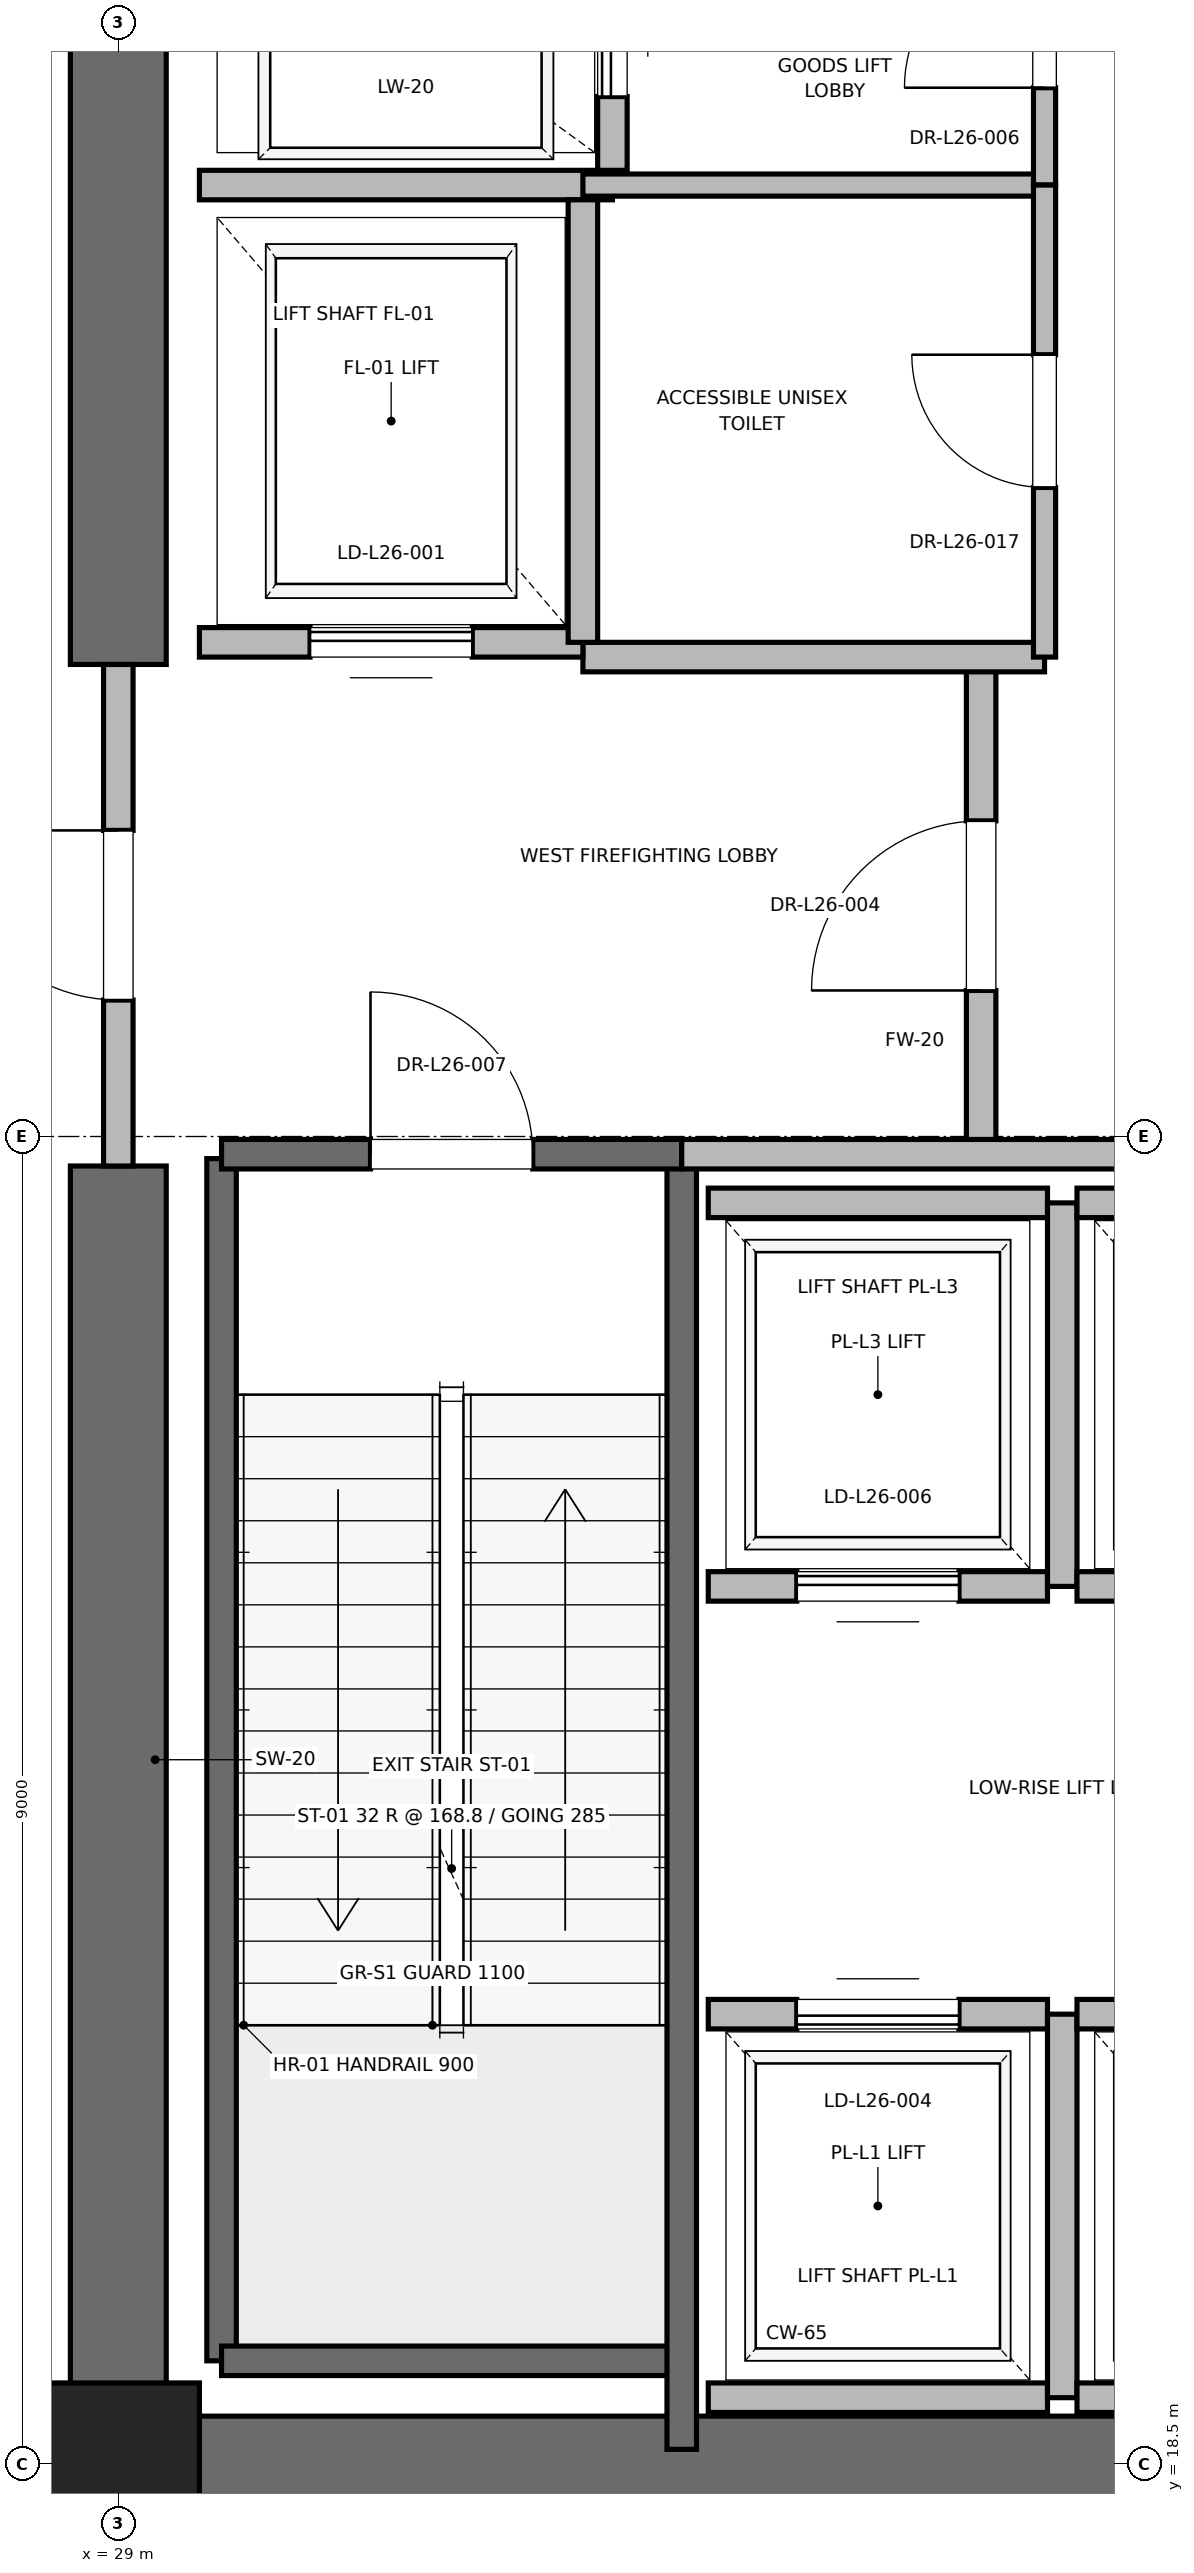
"""IFC4 building model, lengths in metres.
Left out: names, types, materials, properties, quantities, classifications, styles, units other than length and angle.
Written with IfcOpenShell. Run it as: python <this file> out.ifc"""

import sys

from ifc_helpers import new_model, si_unit, direction, frame, frame_2d, origin, origin_2d, place, context, subcontext, project, spatial, rectangle, extrude, element, fill, save


model = new_model("IFC4")
c1 = context("Model", 3, precision=1e-05, world=origin(), true_north=direction((0.0, 1.0)))
c2 = subcontext(c1, "Body", "Model", "MODEL_VIEW")
j1 = project(units=[si_unit("LENGTHUNIT", "METRE"), si_unit("PLANEANGLEUNIT", "RADIAN")], contexts=[c1])
p1 = place(None, origin())
s1 = spatial("IfcSite", under=j1, at=p1, CompositionType="ELEMENT")
p2 = place(p1, origin())
s2 = spatial("IfcBuilding", under=s1, at=p2, CompositionType="ELEMENT")
p3 = place(p2, frame((0.0, 0.0, 113.0)))
s3 = spatial("IfcBuildingStorey", under=s2, at=p3, CompositionType="ELEMENT", Elevation=113.0)
p4 = place(p3, frame((29.0, 18.5, 0.0), z_axis=(0.0, 0.0, 1.0), x_axis=(1.0, 0.0, 0.0)))
e1 = element("IfcColumn", 1, at=p4, inside=s3, PredefinedType="PILASTER", context=c2, shape_type="SweptSolid", body=[
    extrude(rectangle(XDim=1.1, YDim=1.1, at=origin_2d()), origin(), (0.0, 0.0, 1.0), 5.4),
])
p5 = place(p3, frame((29.0, 18.5, 0.0), z_axis=(0.0, 0.0, 1.0), x_axis=(1.0, 0.0, 0.0)))
e2 = element("IfcWall", 2, at=p5, inside=s3, PredefinedType="SHEAR", context=c2, shape_type="SweptSolid", body=[
    extrude(rectangle(XDim=9.2, YDim=0.65, at=frame_2d((4.6, 0.0))), origin(), (0.0, 0.0, 1.0), 5.1),
])
p6 = place(p3, frame((29.0, 18.5, 0.0), z_axis=(0.0, 0.0, 1.0), x_axis=(0.0, 1.0, 0.0)))
e3 = element("IfcWall", 3, at=p6, inside=s3, PredefinedType="SHEAR", context=c2, shape_type="SweptSolid", body=[
    extrude(rectangle(XDim=8.8, YDim=0.65, at=frame_2d((4.4, 0.0))), origin(), (0.0, 0.0, 1.0), 5.1),
])
p7 = place(p3, frame((29.0, 30.7, 0.0), z_axis=(0.0, 0.0, 1.0), x_axis=(0.0, 1.0, 0.0)))
e4 = element("IfcWall", 4, at=p7, inside=s3, PredefinedType="SHEAR", context=c2, shape_type="SweptSolid", body=[
    extrude(rectangle(XDim=5.8, YDim=0.65, at=frame_2d((2.9, 0.0))), origin(), (0.0, 0.0, 1.0), 5.1),
])
p8 = place(p3, frame((29.7, 19.2, 0.0), z_axis=(0.0, 0.0, 1.0), x_axis=(0.0, 1.0, 0.0)))
e5 = element("IfcWall", 5, at=p8, inside=s3, PredefinedType="SOLIDWALL", context=c2, shape_type="SweptSolid", body=[
    extrude(rectangle(XDim=8.15, YDim=0.2, at=frame_2d((4.075, 0.0))), origin(), (0.0, 0.0, 1.0), 5.1),
])
p9 = place(p3, frame((29.7, 19.2, 0.0), z_axis=(0.0, 0.0, 1.0), x_axis=(1.0, 0.0, 0.0)))
e6 = element("IfcWall", 6, at=p9, inside=s3, PredefinedType="SOLIDWALL", context=c2, shape_type="SweptSolid", body=[
    extrude(rectangle(XDim=3.12, YDim=0.2, at=frame_2d((1.56, 0.0))), origin(), (0.0, 0.0, 1.0), 5.1),
])
p10 = place(p3, frame((32.82, 18.6, 0.0), z_axis=(0.0, 0.0, 1.0), x_axis=(0.0, 1.0, 0.0)))
e7 = element("IfcWall", 7, at=p10, inside=s3, PredefinedType="SOLIDWALL", context=c2, shape_type="SweptSolid", body=[
    extrude(rectangle(XDim=8.78, YDim=0.2, at=frame_2d((4.39, 0.0))), origin(), (0.0, 0.0, 1.0), 5.1),
])
p11 = place(p3, frame((29.7, 27.38, 0.0), z_axis=(0.0, 0.0, 1.0), x_axis=(1.0, 0.0, 0.0)))
e8 = element("IfcWall", 8, at=p11, inside=s3, PredefinedType="SOLIDWALL", context=c2, shape_type="SweptSolid", body=[
    extrude(rectangle(XDim=3.12, YDim=0.2, at=frame_2d((1.56, 0.0))), origin(), (0.0, 0.0, 1.0), 5.1),
])
p12 = place(p11, frame((1.01, 0.0, 0.0)))
e9 = element("IfcOpeningElement", 9, at=p12, cuts=e8, PredefinedType="OPENING", context=c2, shape_type="SweptSolid", body=[
    extrude(rectangle(XDim=1.1, YDim=2.15, at=frame_2d((0.55, 1.075))), frame((0.0, 0.1, 0.0), z_axis=(0.0, -1.0, 0.0), x_axis=(1.0, 0.0, 0.0)), (0.0, 0.0, 1.0), 0.2),
])
p13 = place(p3, frame((34.85, 27.38, 0.0), z_axis=(0.0, 0.0, 1.0), x_axis=(0.0, 1.0, 0.0)))
e10 = element("IfcWall", 10, at=p13, inside=s3, PredefinedType="PARTITIONING", context=c2, shape_type="SweptSolid", body=[
    extrude(rectangle(XDim=3.37, YDim=0.2, at=frame_2d((1.685, 0.0))), origin(), (0.0, 0.0, 1.0), 5.1),
])
p14 = place(p13, frame((1.11, 0.0, 0.0)))
e11 = element("IfcOpeningElement", 11, at=p14, cuts=e10, PredefinedType="OPENING", context=c2, shape_type="SweptSolid", body=[
    extrude(rectangle(XDim=1.15, YDim=2.2, at=frame_2d((0.575, 1.1))), frame((0.0, 0.1, 0.0), z_axis=(0.0, -1.0, 0.0), x_axis=(1.0, 0.0, 0.0)), (0.0, 0.0, 1.0), 0.2),
])
p15 = place(p3, frame((29.0, 27.3, 0.0), z_axis=(0.0, 0.0, 1.0), x_axis=(0.0, 1.0, 0.0)))
e12 = element("IfcWall", 12, at=p15, inside=s3, PredefinedType="PARTITIONING", context=c2, shape_type="SweptSolid", body=[
    extrude(rectangle(XDim=3.4, YDim=0.2, at=frame_2d((1.7, 0.0))), origin(), (0.0, 0.0, 1.0), 3.88),
])
p16 = place(p15, frame((1.125, 0.0, 0.0)))
e13 = element("IfcOpeningElement", 13, at=p16, cuts=e12, PredefinedType="OPENING", context=c2, shape_type="SweptSolid", body=[
    extrude(rectangle(XDim=1.15, YDim=2.2, at=frame_2d((0.575, 1.1))), frame((0.0, 0.1, 0.0), z_axis=(0.0, -1.0, 0.0), x_axis=(1.0, 0.0, 0.0)), (0.0, 0.0, 1.0), 0.2),
])
p17 = place(p3, frame((32.82, 27.38, 0.0), z_axis=(0.0, 0.0, 1.0), x_axis=(1.0, 0.0, 0.0)))
e14 = element("IfcWall", 14, at=p17, inside=s3, PredefinedType="PARTITIONING", context=c2, shape_type="SweptSolid", body=[
    extrude(rectangle(XDim=5.62, YDim=0.2, at=frame_2d((2.81, 0.0))), origin(), (0.0, 0.0, 1.0), 5.1),
])
p18 = place(p3, frame((32.15, 30.75, 0.0), z_axis=(0.0, 0.0, 1.0), x_axis=(1.0, 0.0, 0.0)))
e15 = element("IfcWall", 15, at=p18, inside=s3, PredefinedType="PARTITIONING", context=c2, shape_type="SweptSolid", body=[
    extrude(rectangle(XDim=3.13, YDim=0.2, at=frame_2d((1.565, 0.0))), origin(), (0.0, 0.0, 1.0), 5.1),
])
p19 = place(p3, frame((29.55, 30.85, 0.0), z_axis=(0.0, 0.0, 1.0), x_axis=(1.0, 0.0, 0.0)))
e16 = element("IfcWall", 16, at=p19, inside=s3, PredefinedType="SOLIDWALL", context=c2, shape_type="SweptSolid", body=[
    extrude(rectangle(XDim=2.6, YDim=0.2, at=frame_2d((1.3, 0.0))), origin(), (0.0, 0.0, 1.0), 3.88),
])
p20 = place(p19, frame((0.75, 0.0, 0.0)))
e17 = element("IfcOpeningElement", 17, at=p20, cuts=e16, PredefinedType="OPENING", context=c2, shape_type="SweptSolid", body=[
    extrude(rectangle(XDim=1.1, YDim=2.2, at=frame_2d((0.55, 1.1))), frame((0.0, 0.1, 0.0), z_axis=(0.0, -1.0, 0.0), x_axis=(1.0, 0.0, 0.0)), (0.0, 0.0, 1.0), 0.2),
])
p21 = place(p3, frame((29.55, 33.95, 0.0), z_axis=(0.0, 0.0, 1.0), x_axis=(1.0, 0.0, 0.0)))
e18 = element("IfcWall", 18, at=p21, inside=s3, PredefinedType="SOLIDWALL", context=c2, shape_type="SweptSolid", body=[
    extrude(rectangle(XDim=2.8, YDim=0.2, at=frame_2d((1.4, 0.0))), origin(), (0.0, 0.0, 1.0), 5.1),
])
p22 = place(p3, frame((32.15, 30.85, 0.0), z_axis=(0.0, 0.0, 1.0), x_axis=(0.0, 1.0, 0.0)))
e19 = element("IfcWall", 19, at=p22, inside=s3, PredefinedType="SOLIDWALL", context=c2, shape_type="SweptSolid", body=[
    extrude(rectangle(XDim=3.0, YDim=0.2, at=frame_2d((1.5, 0.0))), origin(), (0.0, 0.0, 1.0), 5.1),
])
p23 = place(p3, frame((32.35, 34.05, 0.0), z_axis=(0.0, 0.0, 1.0), x_axis=(0.0, 1.0, 0.0)))
e20 = element("IfcWall", 20, at=p23, inside=s3, PredefinedType="SOLIDWALL", context=c2, shape_type="SweptSolid", body=[
    extrude(rectangle(XDim=2.1, YDim=0.2, at=frame_2d((1.05, 0.0))), origin(), (0.0, 0.0, 1.0), 5.1),
])
p24 = place(p23, frame((0.5, 0.0, 0.0)))
e21 = element("IfcOpeningElement", 21, at=p24, cuts=e20, PredefinedType="OPENING", context=c2, shape_type="SweptSolid", body=[
    extrude(rectangle(XDim=1.1, YDim=2.2, at=frame_2d((0.55, 1.1))), frame((0.0, 0.1, 0.0), z_axis=(0.0, -1.0, 0.0), x_axis=(1.0, 0.0, 0.0)), (0.0, 0.0, 1.0), 0.2),
])
p25 = place(p3, frame((33.0, 18.95, 0.0), z_axis=(0.0, 0.0, 1.0), x_axis=(1.0, 0.0, 0.0)))
e22 = element("IfcWall", 22, at=p25, inside=s3, PredefinedType="SOLIDWALL", context=c2, shape_type="SweptSolid", body=[
    extrude(rectangle(XDim=2.3, YDim=0.2, at=frame_2d((1.15, 0.0))), origin(), (0.0, 0.0, 1.0), 5.1),
])
p26 = place(p3, frame((35.3, 21.55, 0.0), z_axis=(0.0, 0.0, 1.0), x_axis=(-1.0, 0.0, 0.0)))
e23 = element("IfcWall", 23, at=p26, inside=s3, PredefinedType="SOLIDWALL", context=c2, shape_type="SweptSolid", body=[
    extrude(rectangle(XDim=2.3, YDim=0.2, at=frame_2d((1.15, 0.0))), origin(), (0.0, 0.0, 1.0), 5.1),
])
p27 = place(p26, frame((0.6, 0.0, 0.0)))
e24 = element("IfcOpeningElement", 24, at=p27, cuts=e23, PredefinedType="OPENING", context=c2, shape_type="SweptSolid", body=[
    extrude(rectangle(XDim=1.1, YDim=2.2, at=frame_2d((0.55, 1.1))), frame((0.0, 0.1, 0.0), z_axis=(0.0, -1.0, 0.0), x_axis=(1.0, 0.0, 0.0)), (0.0, 0.0, 1.0), 0.2),
])
p28 = place(p3, frame((35.4, 18.95, 0.0), z_axis=(0.0, 0.0, 1.0), x_axis=(0.0, 1.0, 0.0)))
e25 = element("IfcWall", 25, at=p28, inside=s3, PredefinedType="SOLIDWALL", context=c2, shape_type="SweptSolid", body=[
    extrude(rectangle(XDim=2.6, YDim=0.2, at=frame_2d((1.3, 0.0))), origin(), (0.0, 0.0, 1.0), 5.1),
])
p29 = place(p3, frame((35.5, 18.95, 0.0), z_axis=(0.0, 0.0, 1.0), x_axis=(1.0, 0.0, 0.0)))
e26 = element("IfcWall", 26, at=p29, inside=s3, PredefinedType="SOLIDWALL", context=c2, shape_type="SweptSolid", body=[
    extrude(rectangle(XDim=2.3, YDim=0.2, at=frame_2d((1.15, 0.0))), origin(), (0.0, 0.0, 1.0), 3.88),
])
p30 = place(p3, frame((37.8, 21.55, 0.0), z_axis=(0.0, 0.0, 1.0), x_axis=(-1.0, 0.0, 0.0)))
e27 = element("IfcWall", 27, at=p30, inside=s3, PredefinedType="SOLIDWALL", context=c2, shape_type="SweptSolid", body=[
    extrude(rectangle(XDim=2.3, YDim=0.2, at=frame_2d((1.15, 0.0))), origin(), (0.0, 0.0, 1.0), 5.1),
])
p31 = place(p30, frame((0.6, 0.0, 0.0)))
e28 = element("IfcOpeningElement", 28, at=p31, cuts=e27, PredefinedType="OPENING", context=c2, shape_type="SweptSolid", body=[
    extrude(rectangle(XDim=1.1, YDim=2.2, at=frame_2d((0.55, 1.1))), frame((0.0, 0.1, 0.0), z_axis=(0.0, -1.0, 0.0), x_axis=(1.0, 0.0, 0.0)), (0.0, 0.0, 1.0), 0.2),
])
p32 = place(p3, frame((33.0, 24.45, 0.0), z_axis=(0.0, 0.0, 1.0), x_axis=(1.0, 0.0, 0.0)))
e29 = element("IfcWall", 29, at=p32, inside=s3, PredefinedType="SOLIDWALL", context=c2, shape_type="SweptSolid", body=[
    extrude(rectangle(XDim=2.3, YDim=0.2, at=frame_2d((1.15, 0.0))), origin(), (0.0, 0.0, 1.0), 5.1),
])
p33 = place(p32, frame((0.6, 0.0, 0.0)))
e30 = element("IfcOpeningElement", 30, at=p33, cuts=e29, PredefinedType="OPENING", context=c2, shape_type="SweptSolid", body=[
    extrude(rectangle(XDim=1.1, YDim=2.2, at=frame_2d((0.55, 1.1))), frame((0.0, 0.1, 0.0), z_axis=(0.0, -1.0, 0.0), x_axis=(1.0, 0.0, 0.0)), (0.0, 0.0, 1.0), 0.2),
])
p34 = place(p3, frame((35.3, 27.05, 0.0), z_axis=(0.0, 0.0, 1.0), x_axis=(-1.0, 0.0, 0.0)))
e31 = element("IfcWall", 31, at=p34, inside=s3, PredefinedType="SOLIDWALL", context=c2, shape_type="SweptSolid", body=[
    extrude(rectangle(XDim=2.3, YDim=0.2, at=frame_2d((1.15, 0.0))), origin(), (0.0, 0.0, 1.0), 5.1),
])
p35 = place(p3, frame((35.4, 24.45, 0.0), z_axis=(0.0, 0.0, 1.0), x_axis=(0.0, 1.0, 0.0)))
e32 = element("IfcWall", 32, at=p35, inside=s3, PredefinedType="SOLIDWALL", context=c2, shape_type="SweptSolid", body=[
    extrude(rectangle(XDim=2.6, YDim=0.2, at=frame_2d((1.3, 0.0))), origin(), (0.0, 0.0, 1.0), 5.1),
])
p36 = place(p3, frame((35.5, 24.45, 0.0), z_axis=(0.0, 0.0, 1.0), x_axis=(1.0, 0.0, 0.0)))
e33 = element("IfcWall", 33, at=p36, inside=s3, PredefinedType="SOLIDWALL", context=c2, shape_type="SweptSolid", body=[
    extrude(rectangle(XDim=2.3, YDim=0.2, at=frame_2d((1.15, 0.0))), origin(), (0.0, 0.0, 1.0), 5.1),
])
p37 = place(p36, frame((0.6, 0.0, 0.0)))
e34 = element("IfcOpeningElement", 34, at=p37, cuts=e33, PredefinedType="OPENING", context=c2, shape_type="SweptSolid", body=[
    extrude(rectangle(XDim=1.1, YDim=2.2, at=frame_2d((0.55, 1.1))), frame((0.0, 0.1, 0.0), z_axis=(0.0, -1.0, 0.0), x_axis=(1.0, 0.0, 0.0)), (0.0, 0.0, 1.0), 0.2),
])
p38 = place(p3, frame((37.8, 27.05, 0.0), z_axis=(0.0, 0.0, 1.0), x_axis=(-1.0, 0.0, 0.0)))
e35 = element("IfcWall", 35, at=p38, inside=s3, PredefinedType="SOLIDWALL", context=c2, shape_type="SweptSolid", body=[
    extrude(rectangle(XDim=2.3, YDim=0.2, at=frame_2d((1.15, 0.0))), origin(), (0.0, 0.0, 1.0), 5.1),
])
p39 = place(p3, frame((32.15, 33.95, 0.0), z_axis=(0.0, 0.0, 1.0), x_axis=(1.0, 0.0, 0.0)))
e36 = element("IfcWall", 36, at=p39, inside=s3, PredefinedType="PARTITIONING", context=c2, shape_type="SweptSolid", body=[
    extrude(rectangle(XDim=3.13, YDim=0.15, at=frame_2d((1.565, 0.0))), origin(), (0.0, 0.0, 1.0), 2.85),
])
p40 = place(p3, frame((35.28, 33.95, 0.0), z_axis=(0.0, 0.0, 1.0), x_axis=(0.0, 1.0, 0.0)))
e37 = element("IfcWall", 37, at=p40, inside=s3, PredefinedType="PARTITIONING", context=c2, shape_type="SweptSolid", body=[
    extrude(rectangle(XDim=2.27, YDim=0.15, at=frame_2d((1.135, 0.0))), origin(), (0.0, 0.0, 1.0), 2.85),
])
p41 = place(p40, frame((0.66, 0.0, 0.0)))
e38 = element("IfcOpeningElement", 38, at=p41, cuts=e37, PredefinedType="OPENING", context=c2, shape_type="SweptSolid", body=[
    extrude(rectangle(XDim=0.95, YDim=2.15, at=frame_2d((0.475, 1.075))), frame((0.0, 0.075, 0.0), z_axis=(0.0, -1.0, 0.0), x_axis=(1.0, 0.0, 0.0)), (0.0, 0.0, 1.0), 0.15),
])
p42 = place(p3, frame((35.28, 30.75, 0.0), z_axis=(0.0, 0.0, 1.0), x_axis=(0.0, 1.0, 0.0)))
e39 = element("IfcWall", 39, at=p42, inside=s3, PredefinedType="PARTITIONING", context=c2, shape_type="SweptSolid", body=[
    extrude(rectangle(XDim=3.2, YDim=0.15, at=frame_2d((1.6, 0.0))), origin(), (0.0, 0.0, 1.0), 2.85),
])
p43 = place(p42, frame((1.15, 0.0, 0.0)))
e40 = element("IfcOpeningElement", 40, at=p43, cuts=e39, PredefinedType="OPENING", context=c2, shape_type="SweptSolid", body=[
    extrude(rectangle(XDim=0.9, YDim=2.1, at=frame_2d((0.45, 1.05))), frame((0.0, 0.075, 0.0), z_axis=(0.0, -1.0, 0.0), x_axis=(1.0, 0.0, 0.0)), (0.0, 0.0, 1.0), 0.15),
])
p44 = place(p12, origin())
e41 = element("IfcDoor", 41, at=p44, inside=s3, OperationType="SINGLE_SWING_LEFT", PredefinedType="DOOR", context=c2, shape_type="SweptSolid", body=[
    extrude(rectangle(XDim=1.1, YDim=2.15, at=frame_2d((0.55, 1.075))), frame((0.0, 0.025, 0.0), z_axis=(0.0, -1.0, 0.0), x_axis=(1.0, 0.0, 0.0)), (0.0, 0.0, 1.0), 0.05),
])
fill(e9, e41)
p45 = place(p14, origin())
e42 = element("IfcDoor", 42, at=p45, inside=s3, OperationType="SINGLE_SWING_LEFT", PredefinedType="DOOR", context=c2, shape_type="SweptSolid", body=[
    extrude(rectangle(XDim=1.15, YDim=2.2, at=frame_2d((0.575, 1.1))), frame((0.0, 0.025, 0.0), z_axis=(0.0, -1.0, 0.0), x_axis=(1.0, 0.0, 0.0)), (0.0, 0.0, 1.0), 0.05),
])
fill(e11, e42)
p46 = place(p16, origin())
e43 = element("IfcDoor", 43, at=p46, inside=s3, OperationType="SINGLE_SWING_RIGHT", PredefinedType="DOOR", context=c2, shape_type="SweptSolid", body=[
    extrude(rectangle(XDim=1.15, YDim=2.2, at=frame_2d((0.575, 1.1))), frame((0.0, 0.025, 0.0), z_axis=(0.0, -1.0, 0.0), x_axis=(1.0, 0.0, 0.0)), (0.0, 0.0, 1.0), 0.05),
])
fill(e13, e43)
p47 = place(p20, origin())
e44 = element("IfcDoor", 44, at=p47, inside=s3, OperationType="SLIDING_TO_RIGHT", PredefinedType="DOOR", context=c2, shape_type="SweptSolid", body=[
    extrude(rectangle(XDim=1.1, YDim=2.2, at=frame_2d((0.55, 1.1))), frame((0.0, 0.025, 0.0), z_axis=(0.0, -1.0, 0.0), x_axis=(1.0, 0.0, 0.0)), (0.0, 0.0, 1.0), 0.05),
])
fill(e17, e44)
p48 = place(p24, origin())
e45 = element("IfcDoor", 45, at=p48, inside=s3, OperationType="SLIDING_TO_RIGHT", PredefinedType="DOOR", context=c2, shape_type="SweptSolid", body=[
    extrude(rectangle(XDim=1.1, YDim=2.2, at=frame_2d((0.55, 1.1))), frame((0.0, 0.025, 0.0), z_axis=(0.0, -1.0, 0.0), x_axis=(1.0, 0.0, 0.0)), (0.0, 0.0, 1.0), 0.05),
])
fill(e21, e45)
p49 = place(p27, origin())
e46 = element("IfcDoor", 46, at=p49, inside=s3, OperationType="SLIDING_TO_RIGHT", PredefinedType="DOOR", context=c2, shape_type="SweptSolid", body=[
    extrude(rectangle(XDim=1.1, YDim=2.2, at=frame_2d((0.55, 1.1))), frame((0.0, 0.025, 0.0), z_axis=(0.0, -1.0, 0.0), x_axis=(1.0, 0.0, 0.0)), (0.0, 0.0, 1.0), 0.05),
])
fill(e24, e46)
p50 = place(p33, origin())
e47 = element("IfcDoor", 47, at=p50, inside=s3, OperationType="SLIDING_TO_RIGHT", PredefinedType="DOOR", context=c2, shape_type="SweptSolid", body=[
    extrude(rectangle(XDim=1.1, YDim=2.2, at=frame_2d((0.55, 1.1))), frame((0.0, 0.025, 0.0), z_axis=(0.0, -1.0, 0.0), x_axis=(1.0, 0.0, 0.0)), (0.0, 0.0, 1.0), 0.05),
])
fill(e30, e47)
p51 = place(p41, origin())
e48 = element("IfcDoor", 48, at=p51, inside=s3, OperationType="SINGLE_SWING_LEFT", PredefinedType="DOOR", context=c2, shape_type="SweptSolid", body=[
    extrude(rectangle(XDim=0.95, YDim=2.15, at=frame_2d((0.475, 1.075))), frame((0.0, 0.025, 0.0), z_axis=(0.0, -1.0, 0.0), x_axis=(1.0, 0.0, 0.0)), (0.0, 0.0, 1.0), 0.05),
])
fill(e38, e48)
p52 = place(p43, origin())
e49 = element("IfcDoor", 49, at=p52, inside=s3, OperationType="SINGLE_SWING_RIGHT", PredefinedType="DOOR", context=c2, shape_type="SweptSolid", body=[
    extrude(rectangle(XDim=0.9, YDim=2.1, at=frame_2d((0.45, 1.05))), frame((0.0, 0.025, 0.0), z_axis=(0.0, -1.0, 0.0), x_axis=(1.0, 0.0, 0.0)), (0.0, 0.0, 1.0), 0.05),
])
fill(e40, e49)
save(model, sys.argv[1])
